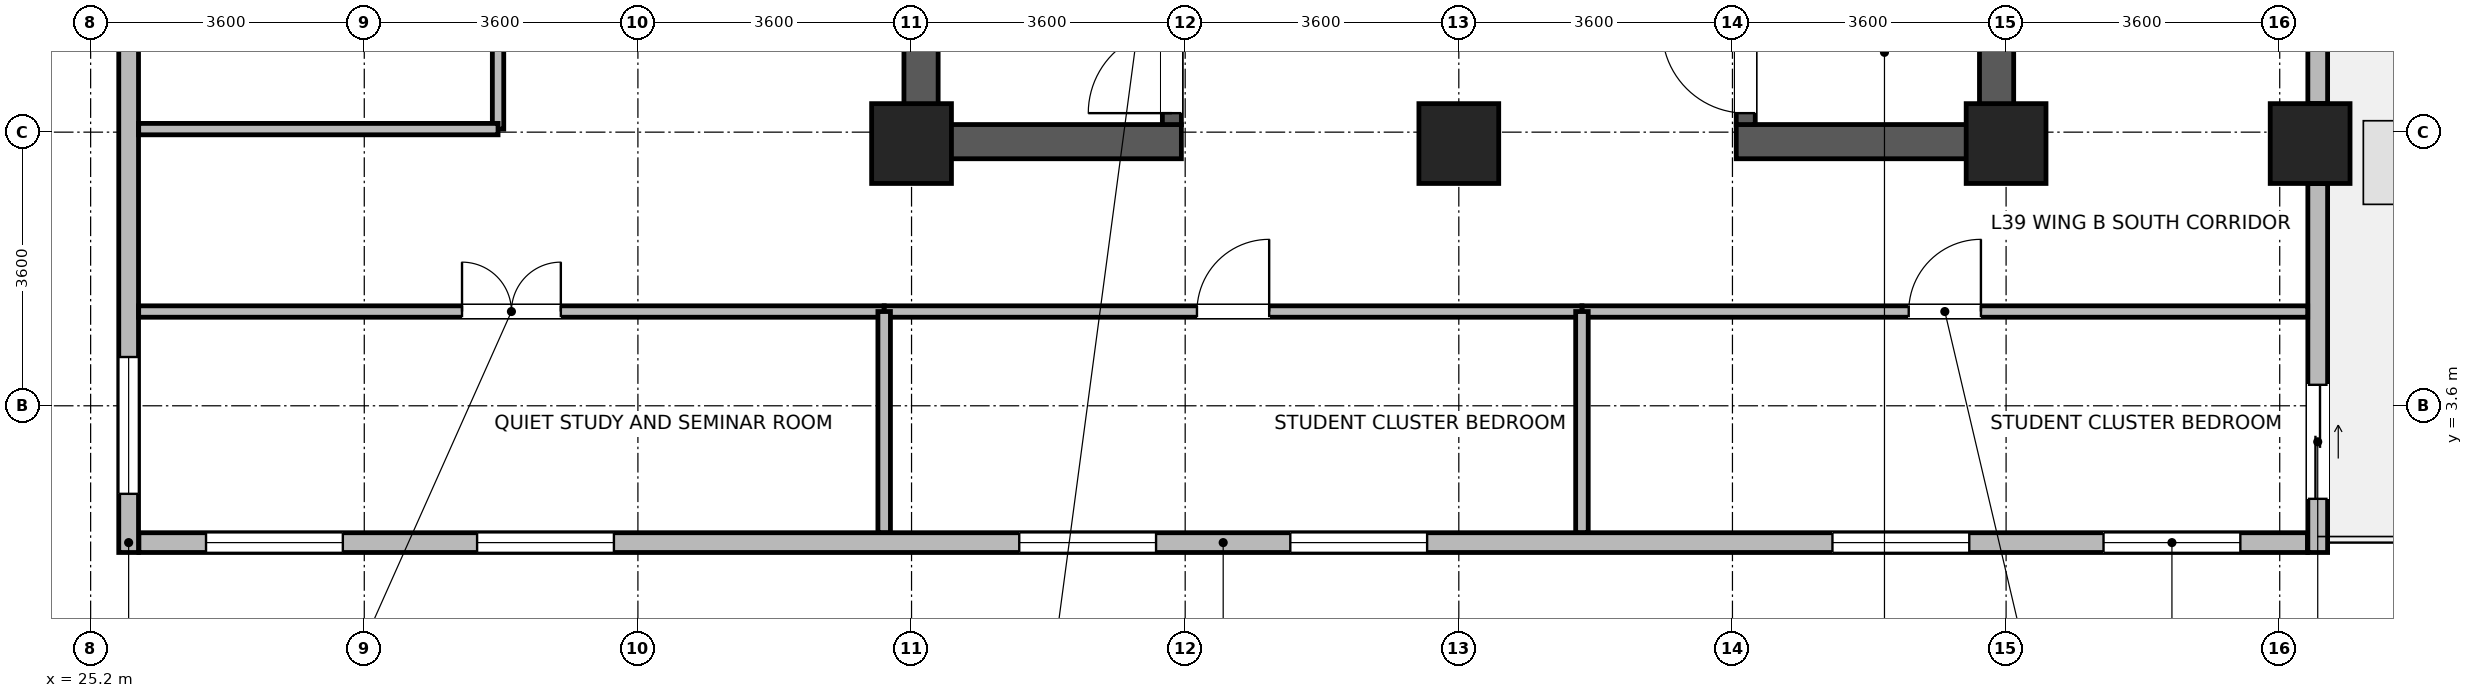
"""IFC4 building model, lengths in metres.
Left out: names, types, materials, properties, quantities, classifications, styles, units other than length and angle.
Written with IfcOpenShell. Run it as: python <this file> out.ifc"""

import sys

from ifc_helpers import new_model, si_unit, direction, frame, frame_2d, origin, origin_2d, place, context, subcontext, project, spatial, rectangle, extrude, source, transform, mapped, element, fill, save


model = new_model("IFC4")
c1 = context("Model", 3, precision=1e-05, world=origin(), true_north=direction((0.0, 1.0)))
c2 = subcontext(c1, "Body", "Model", "MODEL_VIEW")
j1 = project(units=[si_unit("LENGTHUNIT", "METRE"), si_unit("PLANEANGLEUNIT", "RADIAN")], contexts=[c1])
p1 = place(None, origin())
s1 = spatial("IfcSite", under=j1, at=p1, CompositionType="ELEMENT")
p2 = place(p1, origin())
s2 = spatial("IfcBuilding", under=s1, at=p2, CompositionType="ELEMENT")
p3 = place(p2, frame((0.0, 0.0, 155.0)))
s3 = spatial("IfcBuildingStorey", under=s2, at=p3, CompositionType="ELEMENT", Elevation=155.0)
for number, where, z_axis, x_axis in (
    (1, (36.125, 6.85, 0.0), (0.0, 0.0, 1.0), (0.0, 1.0, 0.0)),
    (2, (50.275, 6.85, 0.0), (0.0, 0.0, 1.0), (0.0, 1.0, 0.0)),
):
    element("IfcWall", number, at=place(p3, frame(where, z_axis=z_axis, x_axis=x_axis)), inside=s3, PredefinedType="SHEAR", context=c2, shape_type="SweptSolid", body=[
        extrude(rectangle(XDim=7.9, YDim=0.45, at=frame_2d((3.95, 0.0))), origin(), (0.0, 0.0, 1.0), 3.46),
    ])
for number, where, z_axis, x_axis in (
    (3, (36.35, 7.075, 0.0), (0.0, 0.0, 1.0), (1.0, 0.0, 0.0)),
    (4, (46.85, 7.075, 0.0), (0.0, 0.0, 1.0), (1.0, 0.0, 0.0)),
):
    element("IfcWall", number, at=place(p3, frame(where, z_axis=z_axis, x_axis=x_axis)), inside=s3, PredefinedType="SHEAR", context=c2, shape_type="SweptSolid", body=[
        extrude(rectangle(XDim=3.2, YDim=0.45, at=frame_2d((1.6, 0.0))), origin(), (0.0, 0.0, 1.0), 3.46),
    ])
p4 = place(p3, frame((39.425, 7.3, 0.0), z_axis=(0.0, 0.0, 1.0), x_axis=(0.0, 1.0, 0.0)))
e5 = element("IfcWall", 5, at=p4, inside=s3, PredefinedType="SHEAR", context=c2, shape_type="SweptSolid", body=[
    extrude(rectangle(XDim=7.0, YDim=0.25, at=frame_2d((3.5, 0.0))), origin(), (0.0, 0.0, 1.0), 3.46),
])
p5 = place(p4, frame((0.15, 0.0, 0.0)))
e6 = element("IfcOpeningElement", 6, at=p5, cuts=e5, PredefinedType="OPENING", context=c2, shape_type="SweptSolid", body=[
    extrude(rectangle(XDim=1.1, YDim=2.08, at=frame_2d((0.55, 1.04))), frame((0.0, 0.135, 0.0), z_axis=(0.0, -1.0, 0.0), x_axis=(1.0, 0.0, 0.0)), (0.0, 0.0, 1.0), 0.27),
])
p6 = place(p3, frame((46.975, 7.3, 0.0), z_axis=(0.0, 0.0, 1.0), x_axis=(0.0, 1.0, 0.0)))
e7 = element("IfcWall", 7, at=p6, inside=s3, PredefinedType="SHEAR", context=c2, shape_type="SweptSolid", body=[
    extrude(rectangle(XDim=7.0, YDim=0.25, at=frame_2d((3.5, 0.0))), origin(), (0.0, 0.0, 1.0), 3.46),
])
p7 = place(p6, frame((0.15, 0.0, 0.0)))
e8 = element("IfcOpeningElement", 8, at=p7, cuts=e7, PredefinedType="OPENING", context=c2, shape_type="SweptSolid", body=[
    extrude(rectangle(XDim=1.1, YDim=2.08, at=frame_2d((0.55, 1.04))), frame((0.0, 0.135, 0.0), z_axis=(0.0, -1.0, 0.0), x_axis=(1.0, 0.0, 0.0)), (0.0, 0.0, 1.0), 0.27),
])
m1 = source(origin(), c2, "Body", "SweptSolid", [
    extrude(rectangle(XDim=1.05, YDim=1.05, at=origin_2d()), origin(), (0.0, 0.0, 1.0), 3.7),
])
for number, where, z_axis, x_axis in (
    (9, (36.0, 7.05, 0.0), (0.0, 0.0, 1.0), (1.0, 0.0, 0.0)),
    (10, (43.2, 7.05, 0.0), (0.0, 0.0, 1.0), (1.0, 0.0, 0.0)),
    (11, (50.4, 7.05, 0.0), (0.0, 0.0, 1.0), (1.0, 0.0, 0.0)),
    (12, (54.4, 7.05, 0.0), (0.0, 0.0, 1.0), (1.0, 0.0, 0.0)),
):
    element("IfcColumn", number, at=place(p3, frame(where, z_axis=z_axis, x_axis=x_axis)), inside=s3, PredefinedType="COLUMN", context=c2, shape_type="MappedRepresentation", body=[
        mapped(m1, transform((0.0, 0.0, 0.0), x_axis=(1.0, 0.0, 0.0), y_axis=(0.0, 1.0, 0.0), z_axis=(0.0, 0.0, 1.0), scale=1.0)),
    ])
p8 = place(p3, frame((54.365, 1.8, 0.0), z_axis=(0.0, 0.0, 1.0), x_axis=(-1.0, 0.0, 0.0)))
e13 = element("IfcWall", 13, at=p8, inside=s3, PredefinedType="STANDARD", context=c2, shape_type="SweptSolid", body=[
    extrude(rectangle(XDim=28.53, YDim=0.26, at=frame_2d((14.265, 0.0))), origin(), (0.0, 0.0, 1.0), 3.44),
])
p9 = place(p8, frame((0.883, 0.0, 0.85)))
e14 = element("IfcOpeningElement", 14, at=p9, cuts=e13, PredefinedType="OPENING", context=c2, shape_type="SweptSolid", body=[
    extrude(rectangle(XDim=1.8, YDim=1.85, at=frame_2d((0.9, 0.925))), frame((0.0, 0.14, 0.0), z_axis=(0.0, -1.0, 0.0), x_axis=(1.0, 0.0, 0.0)), (0.0, 0.0, 1.0), 0.28),
])
p10 = place(p8, frame((4.449, 0.0, 0.85)))
e15 = element("IfcOpeningElement", 15, at=p10, cuts=e13, PredefinedType="OPENING", context=c2, shape_type="SweptSolid", body=[
    extrude(rectangle(XDim=1.8, YDim=1.85, at=frame_2d((0.9, 0.925))), frame((0.0, 0.14, 0.0), z_axis=(0.0, -1.0, 0.0), x_axis=(1.0, 0.0, 0.0)), (0.0, 0.0, 1.0), 0.28),
])
p11 = place(p8, frame((11.582, 0.0, 0.85)))
e16 = element("IfcOpeningElement", 16, at=p11, cuts=e13, PredefinedType="OPENING", context=c2, shape_type="SweptSolid", body=[
    extrude(rectangle(XDim=1.8, YDim=1.85, at=frame_2d((0.9, 0.925))), frame((0.0, 0.14, 0.0), z_axis=(0.0, -1.0, 0.0), x_axis=(1.0, 0.0, 0.0)), (0.0, 0.0, 1.0), 0.28),
])
p12 = place(p8, frame((15.148, 0.0, 0.85)))
e17 = element("IfcOpeningElement", 17, at=p12, cuts=e13, PredefinedType="OPENING", context=c2, shape_type="SweptSolid", body=[
    extrude(rectangle(XDim=1.8, YDim=1.85, at=frame_2d((0.9, 0.925))), frame((0.0, 0.14, 0.0), z_axis=(0.0, -1.0, 0.0), x_axis=(1.0, 0.0, 0.0)), (0.0, 0.0, 1.0), 0.28),
])
p13 = place(p8, frame((22.281, 0.0, 0.85)))
e18 = element("IfcOpeningElement", 18, at=p13, cuts=e13, PredefinedType="OPENING", context=c2, shape_type="SweptSolid", body=[
    extrude(rectangle(XDim=1.8, YDim=1.85, at=frame_2d((0.9, 0.925))), frame((0.0, 0.14, 0.0), z_axis=(0.0, -1.0, 0.0), x_axis=(1.0, 0.0, 0.0)), (0.0, 0.0, 1.0), 0.28),
])
p14 = place(p8, frame((25.847, 0.0, 0.85)))
e19 = element("IfcOpeningElement", 19, at=p14, cuts=e13, PredefinedType="OPENING", context=c2, shape_type="SweptSolid", body=[
    extrude(rectangle(XDim=1.8, YDim=1.85, at=frame_2d((0.9, 0.925))), frame((0.0, 0.14, 0.0), z_axis=(0.0, -1.0, 0.0), x_axis=(1.0, 0.0, 0.0)), (0.0, 0.0, 1.0), 0.28),
])
p15 = place(p3, frame((54.5, 6.524, 0.0), z_axis=(0.0, 0.0, 1.0), x_axis=(0.0, -1.0, 0.0)))
e20 = element("IfcWall", 20, at=p15, inside=s3, PredefinedType="STANDARD", context=c2, shape_type="SweptSolid", body=[
    extrude(rectangle(XDim=4.854, YDim=0.26, at=frame_2d((2.427, 0.0))), origin(), (0.0, 0.0, 1.0), 3.44),
])
p16 = place(p15, frame((2.648, 0.0, 0.0)))
e21 = element("IfcOpeningElement", 21, at=p16, cuts=e20, PredefinedType="OPENING", context=c2, shape_type="SweptSolid", body=[
    extrude(rectangle(XDim=1.5, YDim=2.15, at=frame_2d((0.75, 1.075))), frame((0.0, 0.14, 0.0), z_axis=(0.0, -1.0, 0.0), x_axis=(1.0, 0.0, 0.0)), (0.0, 0.0, 1.0), 0.28),
])
p17 = place(p3, frame((54.5, 14.024, 0.0), z_axis=(0.0, 0.0, 1.0), x_axis=(0.0, -1.0, 0.0)))
e22 = element("IfcWall", 22, at=p17, inside=s3, PredefinedType="STANDARD", context=c2, shape_type="SweptSolid", body=[
    extrude(rectangle(XDim=6.448, YDim=0.26, at=frame_2d((3.224, 0.0))), origin(), (0.0, 0.0, 1.0), 2.99),
])
p18 = place(p17, frame((3.936, 0.0, 0.85)))
e23 = element("IfcOpeningElement", 23, at=p18, cuts=e22, PredefinedType="OPENING", context=c2, shape_type="SweptSolid", body=[
    extrude(rectangle(XDim=1.8, YDim=1.85, at=frame_2d((0.9, 0.925))), frame((0.0, 0.14, 0.0), z_axis=(0.0, -1.0, 0.0), x_axis=(1.0, 0.0, 0.0)), (0.0, 0.0, 1.0), 0.28),
])
p19 = place(p17, frame((1.15, 0.0, 0.85)))
e24 = element("IfcOpeningElement", 24, at=p19, cuts=e22, PredefinedType="OPENING", context=c2, shape_type="SweptSolid", body=[
    extrude(rectangle(XDim=0.95, YDim=1.75, at=frame_2d((0.475, 0.875))), frame((0.0, 0.14, 0.0), z_axis=(0.0, -1.0, 0.0), x_axis=(1.0, 0.0, 0.0)), (0.0, 0.0, 1.0), 0.28),
])
p20 = place(p3, frame((25.7, 1.67, 0.0), z_axis=(0.0, 0.0, 1.0), x_axis=(0.0, 1.0, 0.0)))
e25 = element("IfcWall", 25, at=p20, inside=s3, PredefinedType="STANDARD", context=c2, shape_type="SweptSolid", body=[
    extrude(rectangle(XDim=20.06, YDim=0.26, at=frame_2d((10.03, 0.0))), origin(), (0.0, 0.0, 1.0), 3.44),
])
p21 = place(p20, frame((0.772, 0.0, 0.85)))
e26 = element("IfcOpeningElement", 26, at=p21, cuts=e25, PredefinedType="OPENING", context=c2, shape_type="SweptSolid", body=[
    extrude(rectangle(XDim=1.8, YDim=1.85, at=frame_2d((0.9, 0.925))), frame((0.0, 0.14, 0.0), z_axis=(0.0, -1.0, 0.0), x_axis=(1.0, 0.0, 0.0)), (0.0, 0.0, 1.0), 0.28),
])
p22 = place(p20, frame((7.458, 0.0, 0.85)))
e27 = element("IfcOpeningElement", 27, at=p22, cuts=e25, PredefinedType="OPENING", context=c2, shape_type="SweptSolid", body=[
    extrude(rectangle(XDim=1.8, YDim=1.85, at=frame_2d((0.9, 0.925))), frame((0.0, 0.14, 0.0), z_axis=(0.0, -1.0, 0.0), x_axis=(1.0, 0.0, 0.0)), (0.0, 0.0, 1.0), 0.28),
])
p23 = place(p20, frame((14.145, 0.0, 0.85)))
e28 = element("IfcOpeningElement", 28, at=p23, cuts=e25, PredefinedType="OPENING", context=c2, shape_type="SweptSolid", body=[
    extrude(rectangle(XDim=1.8, YDim=1.85, at=frame_2d((0.9, 0.925))), frame((0.0, 0.14, 0.0), z_axis=(0.0, -1.0, 0.0), x_axis=(1.0, 0.0, 0.0)), (0.0, 0.0, 1.0), 0.28),
])
p24 = place(p20, frame((17.488, 0.0, 0.85)))
e29 = element("IfcOpeningElement", 29, at=p24, cuts=e25, PredefinedType="OPENING", context=c2, shape_type="SweptSolid", body=[
    extrude(rectangle(XDim=1.8, YDim=1.85, at=frame_2d((0.9, 0.925))), frame((0.0, 0.14, 0.0), z_axis=(0.0, -1.0, 0.0), x_axis=(1.0, 0.0, 0.0)), (0.0, 0.0, 1.0), 0.28),
])
p25 = place(p3, frame((25.832, 4.84, 0.0), z_axis=(0.0, 0.0, 1.0), x_axis=(1.0, 0.0, 0.0)))
e30 = element("IfcWall", 30, at=p25, inside=s3, PredefinedType="PARTITIONING", context=c2, shape_type="SweptSolid", body=[
    extrude(rectangle(XDim=9.808, YDim=0.15, at=frame_2d((4.904, 0.0))), origin(), (0.0, 0.0, 1.0), 3.44),
])
p26 = place(p25, frame((4.254, 0.0, 0.0)))
e31 = element("IfcOpeningElement", 31, at=p26, cuts=e30, PredefinedType="OPENING", context=c2, shape_type="SweptSolid", body=[
    extrude(rectangle(XDim=1.3, YDim=2.12, at=frame_2d((0.65, 1.06))), frame((0.0, 0.085, 0.0), z_axis=(0.0, -1.0, 0.0), x_axis=(1.0, 0.0, 0.0)), (0.0, 0.0, 1.0), 0.17),
])
p27 = place(p3, frame((44.82, 4.84, 0.0), z_axis=(0.0, 0.0, 1.0), x_axis=(1.0, 0.0, 0.0)))
e32 = element("IfcWall", 32, at=p27, inside=s3, PredefinedType="PARTITIONING", context=c2, shape_type="SweptSolid", body=[
    extrude(rectangle(XDim=9.548, YDim=0.15, at=frame_2d((4.774, 0.0))), origin(), (0.0, 0.0, 1.0), 3.44),
])
p28 = place(p27, frame((4.299, 0.0, 0.0)))
e33 = element("IfcOpeningElement", 33, at=p28, cuts=e32, PredefinedType="OPENING", context=c2, shape_type="SweptSolid", body=[
    extrude(rectangle(XDim=0.95, YDim=2.1, at=frame_2d((0.475, 1.05))), frame((0.0, 0.085, 0.0), z_axis=(0.0, -1.0, 0.0), x_axis=(1.0, 0.0, 0.0)), (0.0, 0.0, 1.0), 0.17),
])
p29 = place(p3, frame((35.64, 4.84, 0.0), z_axis=(0.0, 0.0, 1.0), x_axis=(1.0, 0.0, 0.0)))
e34 = element("IfcWall", 34, at=p29, inside=s3, PredefinedType="PARTITIONING", context=c2, shape_type="SweptSolid", body=[
    extrude(rectangle(XDim=9.18, YDim=0.15, at=frame_2d((4.59, 0.0))), origin(), (0.0, 0.0, 1.0), 3.44),
])
p30 = place(p29, frame((4.115, 0.0, 0.0)))
e35 = element("IfcOpeningElement", 35, at=p30, cuts=e34, PredefinedType="OPENING", context=c2, shape_type="SweptSolid", body=[
    extrude(rectangle(XDim=0.95, YDim=2.1, at=frame_2d((0.475, 1.05))), frame((0.0, 0.085, 0.0), z_axis=(0.0, -1.0, 0.0), x_axis=(1.0, 0.0, 0.0)), (0.0, 0.0, 1.0), 0.17),
])
p31 = place(p3, frame((30.56, 7.24, 0.0), z_axis=(0.0, 0.0, 1.0), x_axis=(0.0, 1.0, 0.0)))
e36 = element("IfcWall", 36, at=p31, inside=s3, PredefinedType="PARTITIONING", context=c2, shape_type="SweptSolid", body=[
    extrude(rectangle(XDim=7.26, YDim=0.15, at=frame_2d((3.63, 0.0))), origin(), (0.0, 0.0, 1.0), 3.44),
])
p32 = place(p31, frame((2.98, 0.0, 0.0)))
e37 = element("IfcOpeningElement", 37, at=p32, cuts=e36, PredefinedType="OPENING", context=c2, shape_type="SweptSolid", body=[
    extrude(rectangle(XDim=1.3, YDim=2.12, at=frame_2d((0.65, 1.06))), frame((0.0, 0.085, 0.0), z_axis=(0.0, -1.0, 0.0), x_axis=(1.0, 0.0, 0.0)), (0.0, 0.0, 1.0), 0.17),
])
p33 = place(p3, frame((25.832, 7.24, 0.0), z_axis=(0.0, 0.0, 1.0), x_axis=(1.0, 0.0, 0.0)))
e38 = element("IfcWall", 38, at=p33, inside=s3, PredefinedType="PARTITIONING", context=c2, shape_type="SweptSolid", body=[
    extrude(rectangle(XDim=4.728, YDim=0.15, at=frame_2d((2.364, 0.0))), origin(), (0.0, 0.0, 1.0), 3.44),
])
for number, where, z_axis, x_axis in (
    (39, (35.64, 1.932, 0.0), (0.0, 0.0, 1.0), (0.0, 1.0, 0.0)),
    (40, (44.82, 1.932, 0.0), (0.0, 0.0, 1.0), (0.0, 1.0, 0.0)),
):
    element("IfcWall", number, at=place(p3, frame(where, z_axis=z_axis, x_axis=x_axis)), inside=s3, PredefinedType="PARTITIONING", context=c2, shape_type="SweptSolid", body=[
        extrude(rectangle(XDim=2.908, YDim=0.165, at=frame_2d((1.454, 0.0))), origin(), (0.0, 0.0, 1.0), 3.44),
    ])
p34 = place(p9, origin())
e41 = element("IfcWindow", 41, at=p34, inside=s3, PartitioningType="SINGLE_PANEL", PredefinedType="WINDOW", context=c2, shape_type="SweptSolid", body=[
    extrude(rectangle(XDim=1.8, YDim=1.85, at=frame_2d((0.9, 0.925))), frame((0.0, 0.03, 0.0), z_axis=(0.0, -1.0, 0.0), x_axis=(1.0, 0.0, 0.0)), (0.0, 0.0, 1.0), 0.06),
])
fill(e14, e41)
p35 = place(p10, origin())
e42 = element("IfcWindow", 42, at=p35, inside=s3, PartitioningType="SINGLE_PANEL", PredefinedType="WINDOW", context=c2, shape_type="SweptSolid", body=[
    extrude(rectangle(XDim=1.8, YDim=1.85, at=frame_2d((0.9, 0.925))), frame((0.0, 0.03, 0.0), z_axis=(0.0, -1.0, 0.0), x_axis=(1.0, 0.0, 0.0)), (0.0, 0.0, 1.0), 0.06),
])
fill(e15, e42)
p36 = place(p11, origin())
e43 = element("IfcWindow", 43, at=p36, inside=s3, PartitioningType="SINGLE_PANEL", PredefinedType="WINDOW", context=c2, shape_type="SweptSolid", body=[
    extrude(rectangle(XDim=1.8, YDim=1.85, at=frame_2d((0.9, 0.925))), frame((0.0, 0.03, 0.0), z_axis=(0.0, -1.0, 0.0), x_axis=(1.0, 0.0, 0.0)), (0.0, 0.0, 1.0), 0.06),
])
fill(e16, e43)
p37 = place(p12, origin())
e44 = element("IfcWindow", 44, at=p37, inside=s3, PartitioningType="SINGLE_PANEL", PredefinedType="WINDOW", context=c2, shape_type="SweptSolid", body=[
    extrude(rectangle(XDim=1.8, YDim=1.85, at=frame_2d((0.9, 0.925))), frame((0.0, 0.03, 0.0), z_axis=(0.0, -1.0, 0.0), x_axis=(1.0, 0.0, 0.0)), (0.0, 0.0, 1.0), 0.06),
])
fill(e17, e44)
p38 = place(p13, origin())
e45 = element("IfcWindow", 45, at=p38, inside=s3, PartitioningType="SINGLE_PANEL", PredefinedType="WINDOW", context=c2, shape_type="SweptSolid", body=[
    extrude(rectangle(XDim=1.8, YDim=1.85, at=frame_2d((0.9, 0.925))), frame((0.0, 0.03, 0.0), z_axis=(0.0, -1.0, 0.0), x_axis=(1.0, 0.0, 0.0)), (0.0, 0.0, 1.0), 0.06),
])
fill(e18, e45)
p39 = place(p14, origin())
e46 = element("IfcWindow", 46, at=p39, inside=s3, PartitioningType="SINGLE_PANEL", PredefinedType="WINDOW", context=c2, shape_type="SweptSolid", body=[
    extrude(rectangle(XDim=1.8, YDim=1.85, at=frame_2d((0.9, 0.925))), frame((0.0, 0.03, 0.0), z_axis=(0.0, -1.0, 0.0), x_axis=(1.0, 0.0, 0.0)), (0.0, 0.0, 1.0), 0.06),
])
fill(e19, e46)
p40 = place(p16, origin())
e47 = element("IfcDoor", 47, at=p40, inside=s3, OperationType="SLIDING_TO_LEFT", PredefinedType="DOOR", context=c2, shape_type="SweptSolid", body=[
    extrude(rectangle(XDim=1.5, YDim=2.15, at=frame_2d((0.75, 1.075))), frame((0.0, 0.025, 0.0), z_axis=(0.0, -1.0, 0.0), x_axis=(1.0, 0.0, 0.0)), (0.0, 0.0, 1.0), 0.05),
])
fill(e21, e47)
p41 = place(p21, origin())
e48 = element("IfcWindow", 48, at=p41, inside=s3, PartitioningType="SINGLE_PANEL", PredefinedType="WINDOW", context=c2, shape_type="SweptSolid", body=[
    extrude(rectangle(XDim=1.8, YDim=1.85, at=frame_2d((0.9, 0.925))), frame((0.0, 0.03, 0.0), z_axis=(0.0, -1.0, 0.0), x_axis=(1.0, 0.0, 0.0)), (0.0, 0.0, 1.0), 0.06),
])
fill(e26, e48)
p42 = place(p5, origin())
e49 = element("IfcDoor", 49, at=p42, inside=s3, OperationType="SINGLE_SWING_LEFT", PredefinedType="DOOR", context=c2, shape_type="SweptSolid", body=[
    extrude(rectangle(XDim=1.1, YDim=2.08, at=frame_2d((0.55, 1.04))), frame((0.0, 0.025, 0.0), z_axis=(0.0, -1.0, 0.0), x_axis=(1.0, 0.0, 0.0)), (0.0, 0.0, 1.0), 0.05),
])
fill(e6, e49)
p43 = place(p7, origin())
e50 = element("IfcDoor", 50, at=p43, inside=s3, OperationType="SINGLE_SWING_RIGHT", PredefinedType="DOOR", context=c2, shape_type="SweptSolid", body=[
    extrude(rectangle(XDim=1.1, YDim=2.08, at=frame_2d((0.55, 1.04))), frame((0.0, 0.025, 0.0), z_axis=(0.0, -1.0, 0.0), x_axis=(1.0, 0.0, 0.0)), (0.0, 0.0, 1.0), 0.05),
])
fill(e8, e50)
p44 = place(p26, origin())
e51 = element("IfcDoor", 51, at=p44, inside=s3, OperationType="DOUBLE_DOOR_SINGLE_SWING", PredefinedType="DOOR", context=c2, shape_type="SweptSolid", body=[
    extrude(rectangle(XDim=1.3, YDim=2.12, at=frame_2d((0.65, 1.06))), frame((0.0, 0.025, 0.0), z_axis=(0.0, -1.0, 0.0), x_axis=(1.0, 0.0, 0.0)), (0.0, 0.0, 1.0), 0.05),
])
fill(e31, e51)
p45 = place(p28, origin())
e52 = element("IfcDoor", 52, at=p45, inside=s3, OperationType="SINGLE_SWING_RIGHT", PredefinedType="DOOR", context=c2, shape_type="SweptSolid", body=[
    extrude(rectangle(XDim=0.95, YDim=2.1, at=frame_2d((0.475, 1.05))), frame((0.0, 0.025, 0.0), z_axis=(0.0, -1.0, 0.0), x_axis=(1.0, 0.0, 0.0)), (0.0, 0.0, 1.0), 0.05),
])
fill(e33, e52)
p46 = place(p30, origin())
e53 = element("IfcDoor", 53, at=p46, inside=s3, OperationType="SINGLE_SWING_RIGHT", PredefinedType="DOOR", context=c2, shape_type="SweptSolid", body=[
    extrude(rectangle(XDim=0.95, YDim=2.1, at=frame_2d((0.475, 1.05))), frame((0.0, 0.025, 0.0), z_axis=(0.0, -1.0, 0.0), x_axis=(1.0, 0.0, 0.0)), (0.0, 0.0, 1.0), 0.05),
])
fill(e35, e53)
save(model, sys.argv[1])
